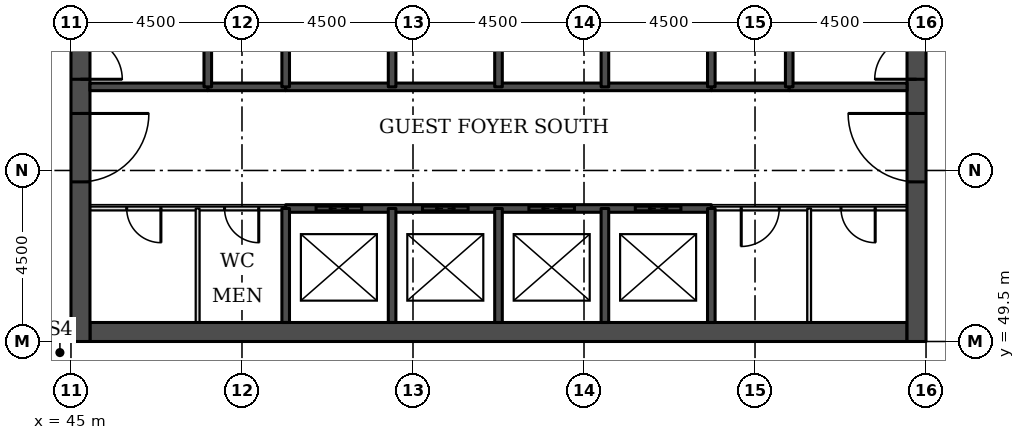
"""IFC4 building model, lengths in metres.
Left out: names, types, materials, properties, quantities, classifications, styles, units other than length and angle.
Written with IfcOpenShell. Run it as: python <this file> out.ifc"""

import sys

from ifc_helpers import new_model, si_unit, direction, frame, frame_2d, origin, place, context, subcontext, project, spatial, rectangle, extrude, element, fill, save


model = new_model("IFC4")
c1 = context("Model", 3, precision=1e-05, world=origin(), true_north=direction((0.0, 1.0)))
c2 = subcontext(c1, "Body", "Model", "MODEL_VIEW")
j1 = project(units=[si_unit("LENGTHUNIT", "METRE"), si_unit("PLANEANGLEUNIT", "RADIAN")], contexts=[c1])
p1 = place(None, origin())
s1 = spatial("IfcSite", under=j1, at=p1, CompositionType="ELEMENT")
p2 = place(p1, origin())
s2 = spatial("IfcBuilding", under=s1, at=p2, CompositionType="ELEMENT")
p3 = place(p2, frame((0.0, 0.0, 49.5)))
s3 = spatial("IfcBuildingStorey", under=s2, at=p3, CompositionType="ELEMENT", Elevation=49.5)
p4 = place(p3, frame((45.5, 49.75, 0.0), z_axis=(0.0, 0.0, 1.0), x_axis=(1.0, 0.0, 0.0)))
e1 = element("IfcWall", 1, at=p4, inside=s3, PredefinedType="SHEAR", context=c2, shape_type="SweptSolid", body=[
    extrude(rectangle(XDim=21.5, YDim=0.5, at=frame_2d((10.75, 0.0))), origin(), (0.0, 0.0, 1.0), 3.3),
])
p5 = place(p3, frame((45.25, 49.5, 0.0), z_axis=(0.0, 0.0, 1.0), x_axis=(0.0, 1.0, 0.0)))
e2 = element("IfcWall", 2, at=p5, inside=s3, PredefinedType="SHEAR", context=c2, shape_type="SweptSolid", body=[
    extrude(rectangle(XDim=22.5, YDim=0.5, at=frame_2d((11.25, 0.0))), origin(), (0.0, 0.0, 1.0), 3.3),
])
p6 = place(p5, frame((4.2, 0.0, 0.0)))
e3 = element("IfcOpeningElement", 3, at=p6, cuts=e2, PredefinedType="OPENING", context=c2, shape_type="SweptSolid", body=[
    extrude(rectangle(XDim=1.8, YDim=2.1, at=frame_2d((0.9, 1.05))), frame((0.0, 0.26, 0.0), z_axis=(0.0, -1.0, 0.0), x_axis=(1.0, 0.0, 0.0)), (0.0, 0.0, 1.0), 0.52),
])
p7 = place(p5, frame((6.9, 0.0, 0.0)))
e4 = element("IfcOpeningElement", 4, at=p7, cuts=e2, PredefinedType="OPENING", context=c2, shape_type="SweptSolid", body=[
    extrude(rectangle(XDim=1.1, YDim=2.1, at=frame_2d((0.55, 1.05))), frame((0.0, 0.26, 0.0), z_axis=(0.0, -1.0, 0.0), x_axis=(1.0, 0.0, 0.0)), (0.0, 0.0, 1.0), 0.52),
])
p8 = place(p5, frame((13.6, 0.0, 0.0)))
e5 = element("IfcOpeningElement", 5, at=p8, cuts=e2, PredefinedType="OPENING", context=c2, shape_type="SweptSolid", body=[
    extrude(rectangle(XDim=1.1, YDim=2.1, at=frame_2d((0.55, 1.05))), frame((0.0, 0.26, 0.0), z_axis=(0.0, -1.0, 0.0), x_axis=(1.0, 0.0, 0.0)), (0.0, 0.0, 1.0), 0.52),
])
p9 = place(p5, frame((16.5, 0.0, 0.0)))
e6 = element("IfcOpeningElement", 6, at=p9, cuts=e2, PredefinedType="OPENING", context=c2, shape_type="SweptSolid", body=[
    extrude(rectangle(XDim=1.8, YDim=2.1, at=frame_2d((0.9, 1.05))), frame((0.0, 0.26, 0.0), z_axis=(0.0, -1.0, 0.0), x_axis=(1.0, 0.0, 0.0)), (0.0, 0.0, 1.0), 0.52),
])
p10 = place(p3, frame((67.25, 49.5, 0.0), z_axis=(0.0, 0.0, 1.0), x_axis=(0.0, 1.0, 0.0)))
e7 = element("IfcWall", 7, at=p10, inside=s3, PredefinedType="SHEAR", context=c2, shape_type="SweptSolid", body=[
    extrude(rectangle(XDim=22.5, YDim=0.5, at=frame_2d((11.25, 0.0))), origin(), (0.0, 0.0, 1.0), 3.3),
])
p11 = place(p10, frame((4.2, 0.0, 0.0)))
e8 = element("IfcOpeningElement", 8, at=p11, cuts=e7, PredefinedType="OPENING", context=c2, shape_type="SweptSolid", body=[
    extrude(rectangle(XDim=1.8, YDim=2.1, at=frame_2d((0.9, 1.05))), frame((0.0, 0.26, 0.0), z_axis=(0.0, -1.0, 0.0), x_axis=(1.0, 0.0, 0.0)), (0.0, 0.0, 1.0), 0.52),
])
p12 = place(p10, frame((6.9, 0.0, 0.0)))
e9 = element("IfcOpeningElement", 9, at=p12, cuts=e7, PredefinedType="OPENING", context=c2, shape_type="SweptSolid", body=[
    extrude(rectangle(XDim=1.1, YDim=2.1, at=frame_2d((0.55, 1.05))), frame((0.0, 0.26, 0.0), z_axis=(0.0, -1.0, 0.0), x_axis=(1.0, 0.0, 0.0)), (0.0, 0.0, 1.0), 0.52),
])
p13 = place(p10, frame((13.6, 0.0, 0.0)))
e10 = element("IfcOpeningElement", 10, at=p13, cuts=e7, PredefinedType="OPENING", context=c2, shape_type="SweptSolid", body=[
    extrude(rectangle(XDim=1.1, YDim=2.1, at=frame_2d((0.55, 1.05))), frame((0.0, 0.26, 0.0), z_axis=(0.0, -1.0, 0.0), x_axis=(1.0, 0.0, 0.0)), (0.0, 0.0, 1.0), 0.52),
])
p14 = place(p10, frame((16.5, 0.0, 0.0)))
e11 = element("IfcOpeningElement", 11, at=p14, cuts=e7, PredefinedType="OPENING", context=c2, shape_type="SweptSolid", body=[
    extrude(rectangle(XDim=1.8, YDim=2.1, at=frame_2d((0.9, 1.05))), frame((0.0, 0.26, 0.0), z_axis=(0.0, -1.0, 0.0), x_axis=(1.0, 0.0, 0.0)), (0.0, 0.0, 1.0), 0.52),
])
p15 = place(p3, frame((45.5, 53.0, 0.0), z_axis=(0.0, 0.0, 1.0), x_axis=(1.0, 0.0, 0.0)))
e12 = element("IfcWall", 12, at=p15, inside=s3, PredefinedType="PARTITIONING", context=c2, shape_type="SweptSolid", body=[
    extrude(rectangle(XDim=5.15, YDim=0.1, at=frame_2d((2.575, 0.0))), origin(), (0.0, 0.0, 1.0), 3.08),
])
p16 = place(p15, frame((0.966, 0.0, 0.0)))
e13 = element("IfcOpeningElement", 13, at=p16, cuts=e12, PredefinedType="OPENING", context=c2, shape_type="SweptSolid", body=[
    extrude(rectangle(XDim=0.9, YDim=2.1, at=frame_2d((0.45, 1.05))), frame((0.0, 0.06, 0.0), z_axis=(0.0, -1.0, 0.0), x_axis=(1.0, 0.0, 0.0)), (0.0, 0.0, 1.0), 0.12),
])
p17 = place(p15, frame((3.541, 0.0, 0.0)))
e14 = element("IfcOpeningElement", 14, at=p17, cuts=e12, PredefinedType="OPENING", context=c2, shape_type="SweptSolid", body=[
    extrude(rectangle(XDim=0.9, YDim=2.1, at=frame_2d((0.45, 1.05))), frame((0.0, 0.06, 0.0), z_axis=(0.0, -1.0, 0.0), x_axis=(1.0, 0.0, 0.0)), (0.0, 0.0, 1.0), 0.12),
])
p18 = place(p3, frame((61.85, 53.0, 0.0), z_axis=(0.0, 0.0, 1.0), x_axis=(1.0, 0.0, 0.0)))
e15 = element("IfcWall", 15, at=p18, inside=s3, PredefinedType="PARTITIONING", context=c2, shape_type="SweptSolid", body=[
    extrude(rectangle(XDim=5.15, YDim=0.1, at=frame_2d((2.575, 0.0))), origin(), (0.0, 0.0, 1.0), 3.08),
])
p19 = place(p18, frame((3.413, 0.0, 0.0)))
e16 = element("IfcOpeningElement", 16, at=p19, cuts=e15, PredefinedType="OPENING", context=c2, shape_type="SweptSolid", body=[
    extrude(rectangle(XDim=0.9, YDim=2.1, at=frame_2d((0.45, 1.05))), frame((0.0, 0.06, 0.0), z_axis=(0.0, -1.0, 0.0), x_axis=(1.0, 0.0, 0.0)), (0.0, 0.0, 1.0), 0.12),
])
p20 = place(p18, frame((0.788, 0.0, 0.0)))
e17 = element("IfcOpeningElement", 17, at=p20, cuts=e15, PredefinedType="OPENING", context=c2, shape_type="SweptSolid", body=[
    extrude(rectangle(XDim=1.0, YDim=2.1, at=frame_2d((0.5, 1.05))), frame((0.0, 0.06, 0.0), z_axis=(0.0, -1.0, 0.0), x_axis=(1.0, 0.0, 0.0)), (0.0, 0.0, 1.0), 0.12),
])
p21 = place(p3, frame((50.65, 53.0, 0.0), z_axis=(0.0, 0.0, 1.0), x_axis=(1.0, 0.0, 0.0)))
e18 = element("IfcWall", 18, at=p21, inside=s3, PredefinedType="SOLIDWALL", context=c2, shape_type="SweptSolid", body=[
    extrude(rectangle(XDim=11.2, YDim=0.2, at=frame_2d((5.6, 0.0))), origin(), (0.0, 0.0, 1.0), 3.08),
])
p22 = place(p21, frame((0.8, 0.0, 0.0)))
e19 = element("IfcOpeningElement", 19, at=p22, cuts=e18, PredefinedType="OPENING", context=c2, shape_type="SweptSolid", body=[
    extrude(rectangle(XDim=1.2, YDim=2.1, at=frame_2d((0.6, 1.05))), frame((0.0, 0.11, 0.0), z_axis=(0.0, -1.0, 0.0), x_axis=(1.0, 0.0, 0.0)), (0.0, 0.0, 1.0), 0.22),
])
p23 = place(p21, frame((3.6, 0.0, 0.0)))
e20 = element("IfcOpeningElement", 20, at=p23, cuts=e18, PredefinedType="OPENING", context=c2, shape_type="SweptSolid", body=[
    extrude(rectangle(XDim=1.2, YDim=2.1, at=frame_2d((0.6, 1.05))), frame((0.0, 0.11, 0.0), z_axis=(0.0, -1.0, 0.0), x_axis=(1.0, 0.0, 0.0)), (0.0, 0.0, 1.0), 0.22),
])
p24 = place(p21, frame((6.4, 0.0, 0.0)))
e21 = element("IfcOpeningElement", 21, at=p24, cuts=e18, PredefinedType="OPENING", context=c2, shape_type="SweptSolid", body=[
    extrude(rectangle(XDim=1.2, YDim=2.1, at=frame_2d((0.6, 1.05))), frame((0.0, 0.11, 0.0), z_axis=(0.0, -1.0, 0.0), x_axis=(1.0, 0.0, 0.0)), (0.0, 0.0, 1.0), 0.22),
])
p25 = place(p21, frame((9.2, 0.0, 0.0)))
e22 = element("IfcOpeningElement", 22, at=p25, cuts=e18, PredefinedType="OPENING", context=c2, shape_type="SweptSolid", body=[
    extrude(rectangle(XDim=1.2, YDim=2.1, at=frame_2d((0.6, 1.05))), frame((0.0, 0.11, 0.0), z_axis=(0.0, -1.0, 0.0), x_axis=(1.0, 0.0, 0.0)), (0.0, 0.0, 1.0), 0.22),
])
for number, where, z_axis, x_axis in (
    (23, (48.6, 56.2, 0.0), (0.0, 0.0, 1.0), (1.0, 0.0, 0.0)),
    (24, (61.85, 56.2, 0.0), (0.0, 0.0, 1.0), (1.0, 0.0, 0.0)),
):
    element("IfcWall", number, at=place(p3, frame(where, z_axis=z_axis, x_axis=x_axis)), inside=s3, PredefinedType="SOLIDWALL", context=c2, shape_type="SweptSolid", body=[
        extrude(rectangle(XDim=2.05, YDim=0.2, at=frame_2d((1.025, 0.0))), origin(), (0.0, 0.0, 1.0), 3.08),
    ])
p26 = place(p3, frame((45.5, 56.2, 0.0), z_axis=(0.0, 0.0, 1.0), x_axis=(1.0, 0.0, 0.0)))
e25 = element("IfcWall", 25, at=p26, inside=s3, PredefinedType="SOLIDWALL", context=c2, shape_type="SweptSolid", body=[
    extrude(rectangle(XDim=3.1, YDim=0.2, at=frame_2d((1.55, 0.0))), origin(), (0.0, 0.0, 1.0), 3.08),
])
p27 = place(p3, frame((50.65, 56.2, 0.0), z_axis=(0.0, 0.0, 1.0), x_axis=(1.0, 0.0, 0.0)))
e26 = element("IfcWall", 26, at=p27, inside=s3, PredefinedType="SOLIDWALL", context=c2, shape_type="SweptSolid", body=[
    extrude(rectangle(XDim=11.2, YDim=0.2, at=frame_2d((5.6, 0.0))), origin(), (0.0, 0.0, 1.0), 3.08),
])
p28 = place(p3, frame((63.9, 56.2, 0.0), z_axis=(0.0, 0.0, 1.0), x_axis=(1.0, 0.0, 0.0)))
e27 = element("IfcWall", 27, at=p28, inside=s3, PredefinedType="SOLIDWALL", context=c2, shape_type="SweptSolid", body=[
    extrude(rectangle(XDim=3.1, YDim=0.2, at=frame_2d((1.55, 0.0))), origin(), (0.0, 0.0, 1.0), 3.08),
])
p29 = place(p3, frame((48.333, 50.0, 0.0), z_axis=(0.0, 0.0, 1.0), x_axis=(0.0, 1.0, 0.0)))
e28 = element("IfcWall", 28, at=p29, inside=s3, PredefinedType="PARTITIONING", context=c2, shape_type="SweptSolid", body=[
    extrude(rectangle(XDim=3.0, YDim=0.1, at=frame_2d((1.5, 0.0))), origin(), (0.0, 0.0, 1.0), 3.08),
])
p30 = place(p3, frame((48.6, 56.2, 0.0), z_axis=(0.0, 0.0, 1.0), x_axis=(0.0, 1.0, 0.0)))
e29 = element("IfcWall", 29, at=p30, inside=s3, PredefinedType="SOLIDWALL", context=c2, shape_type="SweptSolid", body=[
    extrude(rectangle(XDim=5.8, YDim=0.2, at=frame_2d((2.9, 0.0))), origin(), (0.0, 0.0, 1.0), 3.08),
])
p31 = place(p3, frame((50.65, 50.0, 0.0), z_axis=(0.0, 0.0, 1.0), x_axis=(0.0, 1.0, 0.0)))
e30 = element("IfcWall", 30, at=p31, inside=s3, PredefinedType="SOLIDWALL", context=c2, shape_type="SweptSolid", body=[
    extrude(rectangle(XDim=3.0, YDim=0.2, at=frame_2d((1.5, 0.0))), origin(), (0.0, 0.0, 1.0), 3.08),
])
p32 = place(p3, frame((50.65, 56.2, 0.0), z_axis=(0.0, 0.0, 1.0), x_axis=(0.0, 1.0, 0.0)))
e31 = element("IfcWall", 31, at=p32, inside=s3, PredefinedType="SOLIDWALL", context=c2, shape_type="SweptSolid", body=[
    extrude(rectangle(XDim=2.8, YDim=0.2, at=frame_2d((1.4, 0.0))), origin(), (0.0, 0.0, 1.0), 3.08),
])
p33 = place(p3, frame((53.45, 50.0, 0.0), z_axis=(0.0, 0.0, 1.0), x_axis=(0.0, 1.0, 0.0)))
e32 = element("IfcWall", 32, at=p33, inside=s3, PredefinedType="SOLIDWALL", context=c2, shape_type="SweptSolid", body=[
    extrude(rectangle(XDim=3.0, YDim=0.2, at=frame_2d((1.5, 0.0))), origin(), (0.0, 0.0, 1.0), 3.08),
])
p34 = place(p3, frame((53.45, 56.2, 0.0), z_axis=(0.0, 0.0, 1.0), x_axis=(0.0, 1.0, 0.0)))
e33 = element("IfcWall", 33, at=p34, inside=s3, PredefinedType="SOLIDWALL", context=c2, shape_type="SweptSolid", body=[
    extrude(rectangle(XDim=2.8, YDim=0.2, at=frame_2d((1.4, 0.0))), origin(), (0.0, 0.0, 1.0), 3.08),
])
p35 = place(p3, frame((56.25, 50.0, 0.0), z_axis=(0.0, 0.0, 1.0), x_axis=(0.0, 1.0, 0.0)))
e34 = element("IfcWall", 34, at=p35, inside=s3, PredefinedType="SOLIDWALL", context=c2, shape_type="SweptSolid", body=[
    extrude(rectangle(XDim=3.0, YDim=0.2, at=frame_2d((1.5, 0.0))), origin(), (0.0, 0.0, 1.0), 3.08),
])
p36 = place(p3, frame((56.25, 56.2, 0.0), z_axis=(0.0, 0.0, 1.0), x_axis=(0.0, 1.0, 0.0)))
e35 = element("IfcWall", 35, at=p36, inside=s3, PredefinedType="SOLIDWALL", context=c2, shape_type="SweptSolid", body=[
    extrude(rectangle(XDim=2.8, YDim=0.2, at=frame_2d((1.4, 0.0))), origin(), (0.0, 0.0, 1.0), 3.08),
])
p37 = place(p3, frame((59.05, 50.0, 0.0), z_axis=(0.0, 0.0, 1.0), x_axis=(0.0, 1.0, 0.0)))
e36 = element("IfcWall", 36, at=p37, inside=s3, PredefinedType="SOLIDWALL", context=c2, shape_type="SweptSolid", body=[
    extrude(rectangle(XDim=3.0, YDim=0.2, at=frame_2d((1.5, 0.0))), origin(), (0.0, 0.0, 1.0), 3.08),
])
p38 = place(p3, frame((59.05, 56.2, 0.0), z_axis=(0.0, 0.0, 1.0), x_axis=(0.0, 1.0, 0.0)))
e37 = element("IfcWall", 37, at=p38, inside=s3, PredefinedType="SOLIDWALL", context=c2, shape_type="SweptSolid", body=[
    extrude(rectangle(XDim=2.8, YDim=0.2, at=frame_2d((1.4, 0.0))), origin(), (0.0, 0.0, 1.0), 3.08),
])
p39 = place(p3, frame((61.85, 50.0, 0.0), z_axis=(0.0, 0.0, 1.0), x_axis=(0.0, 1.0, 0.0)))
e38 = element("IfcWall", 38, at=p39, inside=s3, PredefinedType="SOLIDWALL", context=c2, shape_type="SweptSolid", body=[
    extrude(rectangle(XDim=3.0, YDim=0.2, at=frame_2d((1.5, 0.0))), origin(), (0.0, 0.0, 1.0), 3.08),
])
p40 = place(p3, frame((61.85, 56.2, 0.0), z_axis=(0.0, 0.0, 1.0), x_axis=(0.0, 1.0, 0.0)))
e39 = element("IfcWall", 39, at=p40, inside=s3, PredefinedType="SOLIDWALL", context=c2, shape_type="SweptSolid", body=[
    extrude(rectangle(XDim=2.8, YDim=0.2, at=frame_2d((1.4, 0.0))), origin(), (0.0, 0.0, 1.0), 3.08),
])
p41 = place(p3, frame((63.9, 56.2, 0.0), z_axis=(0.0, 0.0, 1.0), x_axis=(0.0, 1.0, 0.0)))
e40 = element("IfcWall", 40, at=p41, inside=s3, PredefinedType="SOLIDWALL", context=c2, shape_type="SweptSolid", body=[
    extrude(rectangle(XDim=5.8, YDim=0.2, at=frame_2d((2.9, 0.0))), origin(), (0.0, 0.0, 1.0), 3.08),
])
p42 = place(p3, frame((64.425, 50.0, 0.0), z_axis=(0.0, 0.0, 1.0), x_axis=(0.0, 1.0, 0.0)))
e41 = element("IfcWall", 41, at=p42, inside=s3, PredefinedType="PARTITIONING", context=c2, shape_type="SweptSolid", body=[
    extrude(rectangle(XDim=3.0, YDim=0.1, at=frame_2d((1.5, 0.0))), origin(), (0.0, 0.0, 1.0), 3.08),
])
p43 = place(p22, origin())
e42 = element("IfcDoor", 42, at=p43, inside=s3, OperationType="DOUBLE_DOOR_SLIDING", PredefinedType="DOOR", context=c2, shape_type="SweptSolid", body=[
    extrude(rectangle(XDim=1.2, YDim=2.1, at=frame_2d((0.6, 1.05))), frame((0.0, 0.025, 0.0), z_axis=(0.0, -1.0, 0.0), x_axis=(1.0, 0.0, 0.0)), (0.0, 0.0, 1.0), 0.05),
])
fill(e19, e42)
p44 = place(p23, origin())
e43 = element("IfcDoor", 43, at=p44, inside=s3, OperationType="DOUBLE_DOOR_SLIDING", PredefinedType="DOOR", context=c2, shape_type="SweptSolid", body=[
    extrude(rectangle(XDim=1.2, YDim=2.1, at=frame_2d((0.6, 1.05))), frame((0.0, 0.025, 0.0), z_axis=(0.0, -1.0, 0.0), x_axis=(1.0, 0.0, 0.0)), (0.0, 0.0, 1.0), 0.05),
])
fill(e20, e43)
p45 = place(p24, origin())
e44 = element("IfcDoor", 44, at=p45, inside=s3, OperationType="DOUBLE_DOOR_SLIDING", PredefinedType="DOOR", context=c2, shape_type="SweptSolid", body=[
    extrude(rectangle(XDim=1.2, YDim=2.1, at=frame_2d((0.6, 1.05))), frame((0.0, 0.025, 0.0), z_axis=(0.0, -1.0, 0.0), x_axis=(1.0, 0.0, 0.0)), (0.0, 0.0, 1.0), 0.05),
])
fill(e21, e44)
p46 = place(p25, origin())
e45 = element("IfcDoor", 45, at=p46, inside=s3, OperationType="DOUBLE_DOOR_SLIDING", PredefinedType="DOOR", context=c2, shape_type="SweptSolid", body=[
    extrude(rectangle(XDim=1.2, YDim=2.1, at=frame_2d((0.6, 1.05))), frame((0.0, 0.025, 0.0), z_axis=(0.0, -1.0, 0.0), x_axis=(1.0, 0.0, 0.0)), (0.0, 0.0, 1.0), 0.05),
])
fill(e22, e45)
p47 = place(p6, frame((1.8, 0.0, 0.0), z_axis=(0.0, 0.0, 1.0), x_axis=(-1.0, 0.0, 0.0)))
e46 = element("IfcDoor", 46, at=p47, inside=s3, OperationType="SINGLE_SWING_LEFT", PredefinedType="DOOR", context=c2, shape_type="SweptSolid", body=[
    extrude(rectangle(XDim=1.8, YDim=2.1, at=frame_2d((0.9, 1.05))), frame((0.0, 0.025, 0.0), z_axis=(0.0, -1.0, 0.0), x_axis=(1.0, 0.0, 0.0)), (0.0, 0.0, 1.0), 0.05),
])
fill(e3, e46)
p48 = place(p7, frame((1.1, 0.0, 0.0), z_axis=(0.0, 0.0, 1.0), x_axis=(-1.0, 0.0, 0.0)))
e47 = element("IfcDoor", 47, at=p48, inside=s3, OperationType="SINGLE_SWING_RIGHT", PredefinedType="DOOR", context=c2, shape_type="SweptSolid", body=[
    extrude(rectangle(XDim=1.1, YDim=2.1, at=frame_2d((0.55, 1.05))), frame((0.0, 0.025, 0.0), z_axis=(0.0, -1.0, 0.0), x_axis=(1.0, 0.0, 0.0)), (0.0, 0.0, 1.0), 0.05),
])
fill(e4, e47)
p49 = place(p11, origin())
e48 = element("IfcDoor", 48, at=p49, inside=s3, OperationType="SINGLE_SWING_RIGHT", PredefinedType="DOOR", context=c2, shape_type="SweptSolid", body=[
    extrude(rectangle(XDim=1.8, YDim=2.1, at=frame_2d((0.9, 1.05))), frame((0.0, 0.025, 0.0), z_axis=(0.0, -1.0, 0.0), x_axis=(1.0, 0.0, 0.0)), (0.0, 0.0, 1.0), 0.05),
])
fill(e8, e48)
p50 = place(p12, origin())
e49 = element("IfcDoor", 49, at=p50, inside=s3, OperationType="SINGLE_SWING_LEFT", PredefinedType="DOOR", context=c2, shape_type="SweptSolid", body=[
    extrude(rectangle(XDim=1.1, YDim=2.1, at=frame_2d((0.55, 1.05))), frame((0.0, 0.025, 0.0), z_axis=(0.0, -1.0, 0.0), x_axis=(1.0, 0.0, 0.0)), (0.0, 0.0, 1.0), 0.05),
])
fill(e9, e49)
p51 = place(p19, frame((0.9, 0.0, 0.0), z_axis=(0.0, 0.0, 1.0), x_axis=(-1.0, 0.0, 0.0)))
e50 = element("IfcDoor", 50, at=p51, inside=s3, OperationType="SINGLE_SWING_LEFT", PredefinedType="DOOR", context=c2, shape_type="SweptSolid", body=[
    extrude(rectangle(XDim=0.9, YDim=2.1, at=frame_2d((0.45, 1.05))), frame((0.0, 0.025, 0.0), z_axis=(0.0, -1.0, 0.0), x_axis=(1.0, 0.0, 0.0)), (0.0, 0.0, 1.0), 0.05),
])
fill(e16, e50)
p52 = place(p20, frame((1.0, 0.0, 0.0), z_axis=(0.0, 0.0, 1.0), x_axis=(-1.0, 0.0, 0.0)))
e51 = element("IfcDoor", 51, at=p52, inside=s3, OperationType="SINGLE_SWING_RIGHT", PredefinedType="DOOR", context=c2, shape_type="SweptSolid", body=[
    extrude(rectangle(XDim=1.0, YDim=2.1, at=frame_2d((0.5, 1.05))), frame((0.0, 0.025, 0.0), z_axis=(0.0, -1.0, 0.0), x_axis=(1.0, 0.0, 0.0)), (0.0, 0.0, 1.0), 0.05),
])
fill(e17, e51)
p53 = place(p16, frame((0.9, 0.0, 0.0), z_axis=(0.0, 0.0, 1.0), x_axis=(-1.0, 0.0, 0.0)))
e52 = element("IfcDoor", 52, at=p53, inside=s3, OperationType="SINGLE_SWING_LEFT", PredefinedType="DOOR", context=c2, shape_type="SweptSolid", body=[
    extrude(rectangle(XDim=0.9, YDim=2.1, at=frame_2d((0.45, 1.05))), frame((0.0, 0.025, 0.0), z_axis=(0.0, -1.0, 0.0), x_axis=(1.0, 0.0, 0.0)), (0.0, 0.0, 1.0), 0.05),
])
fill(e13, e52)
p54 = place(p17, frame((0.9, 0.0, 0.0), z_axis=(0.0, 0.0, 1.0), x_axis=(-1.0, 0.0, 0.0)))
e53 = element("IfcDoor", 53, at=p54, inside=s3, OperationType="SINGLE_SWING_LEFT", PredefinedType="DOOR", context=c2, shape_type="SweptSolid", body=[
    extrude(rectangle(XDim=0.9, YDim=2.1, at=frame_2d((0.45, 1.05))), frame((0.0, 0.025, 0.0), z_axis=(0.0, -1.0, 0.0), x_axis=(1.0, 0.0, 0.0)), (0.0, 0.0, 1.0), 0.05),
])
fill(e14, e53)
save(model, sys.argv[1])
